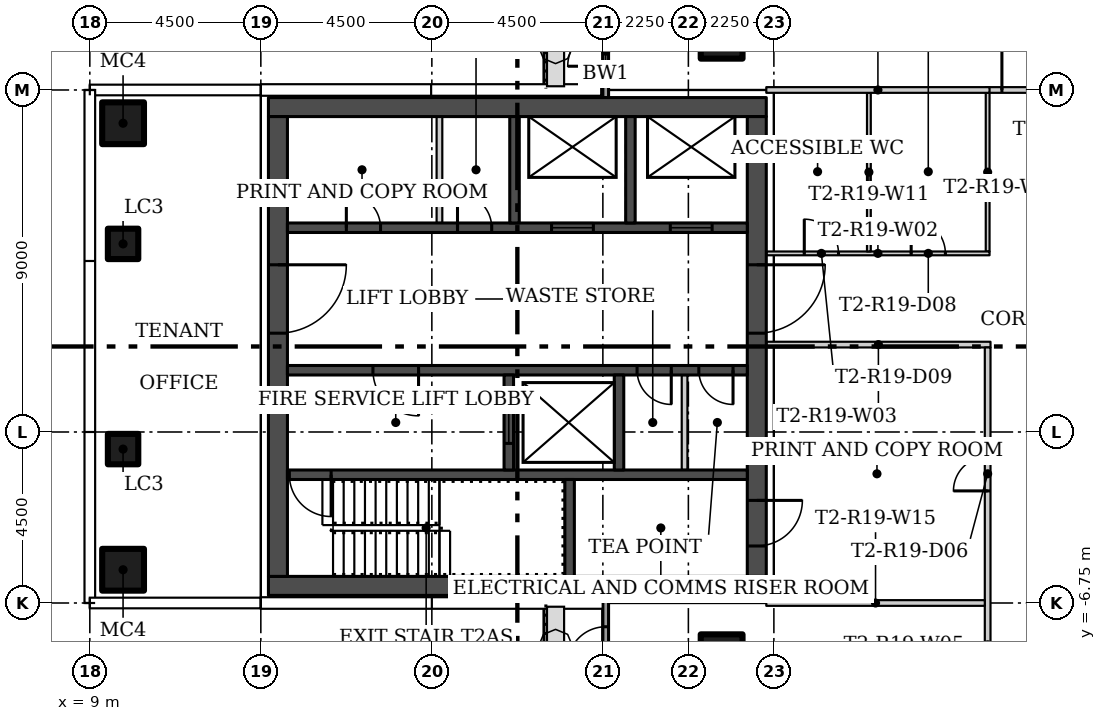
"""IFC4 building model, lengths in metres.
Left out: names, types, materials, properties, quantities, classifications, styles, units other than length and angle.
Written with IfcOpenShell. Run it as: python <this file> out.ifc"""

import sys

from ifc_helpers import new_model, si_unit, direction, frame, frame_2d, origin, origin_2d, place, context, subcontext, project, spatial, rectangle, hollow_rectangle, extrude, element, fill, save


model = new_model("IFC4")
c1 = context("Model", 3, precision=1e-05, world=origin(), true_north=direction((0.0, 1.0)))
c2 = subcontext(c1, "Body", "Model", "MODEL_VIEW")
j1 = project(units=[si_unit("LENGTHUNIT", "METRE"), si_unit("PLANEANGLEUNIT", "RADIAN")], contexts=[c1])
p1 = place(None, origin())
s1 = spatial("IfcSite", under=j1, at=p1, CompositionType="ELEMENT")
p2 = place(p1, origin())
s2 = spatial("IfcBuilding", under=s1, at=p2, CompositionType="ELEMENT")
p3 = place(p2, frame((0.0, 0.0, 174.0)))
s3 = spatial("IfcBuildingStorey", under=s2, at=p3, CompositionType="ELEMENT", Elevation=174.0)
for number, where in (
    (1, (25.625, 8.125, 0.0)),
    (2, (25.625, -8.125, 0.0)),
    (3, (9.875, -5.875, 0.0)),
    (4, (9.875, 5.875, 0.0)),
):
    element("IfcColumn", number, at=place(p3, frame(where)), inside=s3, PredefinedType="COLUMN", context=c2, shape_type="SweptSolid", body=[
        extrude(hollow_rectangle(XDim=1.1, YDim=1.1, WallThickness=0.04, at=origin_2d()), origin(), (0.0, 0.0, 1.0), 3.45),
    ])
for number, where in (
    (5, (9.875, -2.7, 0.0)),
    (6, (9.875, 2.7, 0.0)),
):
    element("IfcColumn", number, at=place(p3, frame(where)), inside=s3, PredefinedType="COLUMN", context=c2, shape_type="SweptSolid", body=[
        extrude(hollow_rectangle(XDim=0.8, YDim=0.8, WallThickness=0.03, at=origin_2d()), origin(), (0.0, 0.0, 1.0), 3.45),
    ])
p4 = place(p3, frame((32.625, 2.5, 0.0), z_axis=(0.0, 0.0, 1.0), x_axis=(0.0, 1.0, 0.0)))
e7 = element("IfcWall", 7, at=p4, inside=s3, PredefinedType="PARTITIONING", context=c2, shape_type="SweptSolid", body=[
    extrude(rectangle(XDim=4.175, YDim=0.1, at=frame_2d((2.087, 0.0))), origin(), (0.0, 0.0, 1.0), 3.45),
])
p5 = place(p3, frame((26.8, 2.45, 0.0)))
e8 = element("IfcWall", 8, at=p5, inside=s3, PredefinedType="PARTITIONING", context=c2, shape_type="SweptSolid", body=[
    extrude(rectangle(XDim=5.875, YDim=0.1, at=frame_2d((2.938, 0.0))), origin(), (0.0, 0.0, 1.0), 3.45),
])
p6 = place(p5, frame((3.812, 0.0, 0.0)))
e9 = element("IfcOpeningElement", 9, at=p6, cuts=e8, PredefinedType="OPENING", context=c2, shape_type="SweptSolid", body=[
    extrude(rectangle(XDim=0.9, YDim=2.1, at=frame_2d((0.45, 1.05))), frame((0.0, 0.06, 0.0), z_axis=(0.0, -1.0, 0.0), x_axis=(1.0, 0.0, 0.0)), (0.0, 0.0, 1.0), 0.12),
])
p7 = place(p5, frame((1.0, 0.0, 0.0)))
e10 = element("IfcOpeningElement", 10, at=p7, cuts=e8, PredefinedType="OPENING", context=c2, shape_type="SweptSolid", body=[
    extrude(rectangle(XDim=0.9, YDim=2.1, at=frame_2d((0.45, 1.05))), frame((0.0, 0.06, 0.0), z_axis=(0.0, -1.0, 0.0), x_axis=(1.0, 0.0, 0.0)), (0.0, 0.0, 1.0), 0.12),
])
p8 = place(p3, frame((32.7, 0.05, 0.0), z_axis=(0.0, 0.0, 1.0), x_axis=(-1.0, 0.0, 0.0)))
e11 = element("IfcWall", 11, at=p8, inside=s3, PredefinedType="PARTITIONING", context=c2, shape_type="SweptSolid", body=[
    extrude(rectangle(XDim=5.9, YDim=0.15, at=frame_2d((2.95, 0.0))), origin(), (0.0, 0.0, 1.0), 3.45),
])
p9 = place(p3, frame((32.625, -15.675, 0.0), z_axis=(0.0, 0.0, 1.0), x_axis=(0.0, 1.0, 0.0)))
e12 = element("IfcWall", 12, at=p9, inside=s3, PredefinedType="PARTITIONING", context=c2, shape_type="SweptSolid", body=[
    extrude(rectangle(XDim=15.65, YDim=0.15, at=frame_2d((7.825, 0.0))), origin(), (0.0, 0.0, 1.0), 3.45),
])
p10 = place(p9, frame((11.875, 0.0, 0.0)))
e13 = element("IfcOpeningElement", 13, at=p10, cuts=e12, PredefinedType="OPENING", context=c2, shape_type="SweptSolid", body=[
    extrude(rectangle(XDim=0.9, YDim=2.1, at=frame_2d((0.45, 1.05))), frame((0.0, 0.085, 0.0), z_axis=(0.0, -1.0, 0.0), x_axis=(1.0, 0.0, 0.0)), (0.0, 0.0, 1.0), 0.17),
])
p11 = place(p9, frame((3.925, 0.0, 0.0)))
e14 = element("IfcOpeningElement", 14, at=p11, cuts=e12, PredefinedType="OPENING", context=c2, shape_type="SweptSolid", body=[
    extrude(rectangle(XDim=1.0, YDim=2.4, at=frame_2d((0.5, 1.2))), frame((0.0, 0.085, 0.0), z_axis=(0.0, -1.0, 0.0), x_axis=(1.0, 0.0, 0.0)), (0.0, 0.0, 1.0), 0.17),
])
p12 = place(p3, frame((32.575, 6.75, 0.0)))
e15 = element("IfcWall", 15, at=p12, inside=s3, PredefinedType="PARTITIONING", context=c2, shape_type="SweptSolid", body=[
    extrude(rectangle(XDim=2.375, YDim=0.15, at=frame_2d((1.188, 0.0))), origin(), (0.0, 0.0, 1.0), 3.45),
])
p13 = place(p12, frame((0.425, 0.0, 0.0)))
e16 = element("IfcOpeningElement", 16, at=p13, cuts=e15, PredefinedType="OPENING", context=c2, shape_type="SweptSolid", body=[
    extrude(rectangle(XDim=1.5, YDim=2.1, at=frame_2d((0.75, 1.05))), frame((0.0, 0.085, 0.0), z_axis=(0.0, -1.0, 0.0), x_axis=(1.0, 0.0, 0.0)), (0.0, 0.0, 1.0), 0.17),
])
p14 = place(p3, frame((29.5, 6.675, 0.0), z_axis=(0.0, 0.0, 1.0), x_axis=(0.0, -1.0, 0.0)))
e17 = element("IfcWall", 17, at=p14, inside=s3, PredefinedType="PARTITIONING", context=c2, shape_type="SweptSolid", body=[
    extrude(rectangle(XDim=4.175, YDim=0.1, at=frame_2d((2.087, 0.0))), origin(), (0.0, 0.0, 1.0), 3.45),
])
p15 = place(p3, frame((32.675, 6.75, 0.0), z_axis=(0.0, 0.0, 1.0), x_axis=(-1.0, 0.0, 0.0)))
e18 = element("IfcWall", 18, at=p15, inside=s3, PredefinedType="PARTITIONING", context=c2, shape_type="SweptSolid", body=[
    extrude(rectangle(XDim=5.875, YDim=0.15, at=frame_2d((2.938, 0.0))), origin(), (0.0, 0.0, 1.0), 3.45),
])
p16 = place(p3, frame((26.8, -6.75, 0.0)))
e19 = element("IfcWall", 19, at=p16, inside=s3, PredefinedType="PARTITIONING", context=c2, shape_type="SweptSolid", body=[
    extrude(rectangle(XDim=5.75, YDim=0.15, at=frame_2d((2.875, 0.0))), origin(), (0.0, 0.0, 1.0), 3.45),
])
p17 = place(p3, frame((22.575, 6.543, 0.0), z_axis=(0.0, 0.0, 1.0), x_axis=(0.0, 1.0, 0.0)))
e20 = element("IfcWall", 20, at=p17, inside=s3, PredefinedType="SOLIDWALL", context=c2, shape_type="SweptSolid", body=[
    extrude(rectangle(XDim=2.457, YDim=0.15, at=frame_2d((1.229, 0.0))), origin(), (0.0, 0.0, 1.0), 3.45),
])
p18 = place(p17, frame((0.832, 0.0, 0.0)))
e21 = element("IfcOpeningElement", 21, at=p18, cuts=e20, PredefinedType="OPENING", context=c2, shape_type="SweptSolid", body=[
    extrude(rectangle(XDim=1.0, YDim=2.4, at=frame_2d((0.5, 1.2))), frame((0.0, 0.085, 0.0), z_axis=(0.0, -1.0, 0.0), x_axis=(1.0, 0.0, 0.0)), (0.0, 0.0, 1.0), 0.17),
])
p19 = place(p3, frame((22.575, -9.0, 0.0), z_axis=(0.0, 0.0, 1.0), x_axis=(0.0, 1.0, 0.0)))
e22 = element("IfcWall", 22, at=p19, inside=s3, PredefinedType="SOLIDWALL", context=c2, shape_type="SweptSolid", body=[
    extrude(rectangle(XDim=2.457, YDim=0.15, at=frame_2d((1.229, 0.0))), origin(), (0.0, 0.0, 1.0), 3.45),
])
p20 = place(p19, frame((0.625, 0.0, 0.0)))
e23 = element("IfcOpeningElement", 23, at=p20, cuts=e22, PredefinedType="OPENING", context=c2, shape_type="SweptSolid", body=[
    extrude(rectangle(XDim=1.0, YDim=2.4, at=frame_2d((0.5, 1.2))), frame((0.0, 0.085, 0.0), z_axis=(0.0, -1.0, 0.0), x_axis=(1.0, 0.0, 0.0)), (0.0, 0.0, 1.0), 0.17),
])
for number, where in (
    (24, (13.7, -6.3, 0.0)),
    (25, (13.7, 6.3, 0.0)),
):
    element("IfcWall", number, at=place(p3, frame(where)), inside=s3, PredefinedType="SHEAR", context=c2, shape_type="SweptSolid", body=[
        extrude(rectangle(XDim=13.1, YDim=0.5, at=frame_2d((6.55, 0.0))), origin(), (0.0, 0.0, 1.0), 3.45),
    ])
p21 = place(p3, frame((13.95, 6.05, 0.0), z_axis=(0.0, 0.0, 1.0), x_axis=(0.0, -1.0, 0.0)))
e26 = element("IfcWall", 26, at=p21, inside=s3, PredefinedType="SHEAR", context=c2, shape_type="SweptSolid", body=[
    extrude(rectangle(XDim=12.1, YDim=0.5, at=frame_2d((6.05, 0.0))), origin(), (0.0, 0.0, 1.0), 3.45),
])
p22 = place(p21, frame((3.9, 0.0, 0.0)))
e27 = element("IfcOpeningElement", 27, at=p22, cuts=e26, PredefinedType="OPENING", context=c2, shape_type="SweptSolid", body=[
    extrude(rectangle(XDim=1.8, YDim=2.4, at=frame_2d((0.9, 1.2))), frame((0.0, 0.26, 0.0), z_axis=(0.0, -1.0, 0.0), x_axis=(1.0, 0.0, 0.0)), (0.0, 0.0, 1.0), 0.52),
])
p23 = place(p3, frame((26.55, 6.05, 0.0), z_axis=(0.0, 0.0, 1.0), x_axis=(0.0, -1.0, 0.0)))
e28 = element("IfcWall", 28, at=p23, inside=s3, PredefinedType="SHEAR", context=c2, shape_type="SweptSolid", body=[
    extrude(rectangle(XDim=12.1, YDim=0.5, at=frame_2d((6.05, 0.0))), origin(), (0.0, 0.0, 1.0), 3.45),
])
p24 = place(p23, frame((10.1, 0.0, 0.0)))
e29 = element("IfcOpeningElement", 29, at=p24, cuts=e28, PredefinedType="OPENING", context=c2, shape_type="SweptSolid", body=[
    extrude(rectangle(XDim=1.2, YDim=2.1, at=frame_2d((0.6, 1.05))), frame((0.0, 0.26, 0.0), z_axis=(0.0, -1.0, 0.0), x_axis=(1.0, 0.0, 0.0)), (0.0, 0.0, 1.0), 0.52),
])
p25 = place(p23, frame((3.9, 0.0, 0.0)))
e30 = element("IfcOpeningElement", 30, at=p25, cuts=e28, PredefinedType="OPENING", context=c2, shape_type="SweptSolid", body=[
    extrude(rectangle(XDim=1.8, YDim=2.4, at=frame_2d((0.9, 1.2))), frame((0.0, 0.26, 0.0), z_axis=(0.0, -1.0, 0.0), x_axis=(1.0, 0.0, 0.0)), (0.0, 0.0, 1.0), 0.52),
])
p26 = place(p3, frame((26.3, -3.375, 0.0), z_axis=(0.0, 0.0, 1.0), x_axis=(-1.0, 0.0, 0.0)))
e31 = element("IfcWall", 31, at=p26, inside=s3, PredefinedType="SHEAR", context=c2, shape_type="SweptSolid", body=[
    extrude(rectangle(XDim=12.1, YDim=0.25, at=frame_2d((6.05, 0.0))), origin(), (0.0, 0.0, 1.0), 3.45),
])
p27 = place(p26, frame((10.95, 0.0, 0.0)))
e32 = element("IfcOpeningElement", 32, at=p27, cuts=e31, PredefinedType="OPENING", context=c2, shape_type="SweptSolid", body=[
    extrude(rectangle(XDim=1.1, YDim=2.1, at=frame_2d((0.55, 1.05))), frame((0.0, 0.135, 0.0), z_axis=(0.0, -1.0, 0.0), x_axis=(1.0, 0.0, 0.0)), (0.0, 0.0, 1.0), 0.27),
])
p28 = place(p3, frame((21.625, -6.05, 0.0), z_axis=(0.0, 0.0, 1.0), x_axis=(0.0, 1.0, 0.0)))
e33 = element("IfcWall", 33, at=p28, inside=s3, PredefinedType="SHEAR", context=c2, shape_type="SweptSolid", body=[
    extrude(rectangle(XDim=2.55, YDim=0.25, at=frame_2d((1.275, 0.0))), origin(), (0.0, 0.0, 1.0), 3.45),
])
p29 = place(p3, frame((26.3, -0.625, 0.0), z_axis=(0.0, 0.0, 1.0), x_axis=(-1.0, 0.0, 0.0)))
e34 = element("IfcWall", 34, at=p29, inside=s3, PredefinedType="SHEAR", context=c2, shape_type="SweptSolid", body=[
    extrude(rectangle(XDim=12.1, YDim=0.25, at=frame_2d((6.05, 0.0))), origin(), (0.0, 0.0, 1.0), 3.45),
])
p30 = place(p29, frame((8.65, 0.0, 0.0)))
e35 = element("IfcOpeningElement", 35, at=p30, cuts=e34, PredefinedType="OPENING", context=c2, shape_type="SweptSolid", body=[
    extrude(rectangle(XDim=1.2, YDim=2.1, at=frame_2d((0.6, 1.05))), frame((0.0, 0.135, 0.0), z_axis=(0.0, -1.0, 0.0), x_axis=(1.0, 0.0, 0.0)), (0.0, 0.0, 1.0), 0.27),
])
p31 = place(p29, frame((2.0, 0.0, 0.0)))
e36 = element("IfcOpeningElement", 36, at=p31, cuts=e34, PredefinedType="OPENING", context=c2, shape_type="SweptSolid", body=[
    extrude(rectangle(XDim=0.9, YDim=2.1, at=frame_2d((0.45, 1.05))), frame((0.0, 0.135, 0.0), z_axis=(0.0, -1.0, 0.0), x_axis=(1.0, 0.0, 0.0)), (0.0, 0.0, 1.0), 0.27),
])
p32 = place(p29, frame((0.375, 0.0, 0.0)))
e37 = element("IfcOpeningElement", 37, at=p32, cuts=e34, PredefinedType="OPENING", context=c2, shape_type="SweptSolid", body=[
    extrude(rectangle(XDim=0.9, YDim=2.1, at=frame_2d((0.45, 1.05))), frame((0.0, 0.135, 0.0), z_axis=(0.0, -1.0, 0.0), x_axis=(1.0, 0.0, 0.0)), (0.0, 0.0, 1.0), 0.27),
])
p33 = place(p3, frame((20.025, -3.25, 0.0), z_axis=(0.0, 0.0, 1.0), x_axis=(0.0, 1.0, 0.0)))
e38 = element("IfcWall", 38, at=p33, inside=s3, PredefinedType="SHEAR", context=c2, shape_type="SweptSolid", body=[
    extrude(rectangle(XDim=2.5, YDim=0.25, at=frame_2d((1.25, 0.0))), origin(), (0.0, 0.0, 1.0), 3.45),
])
p34 = place(p33, frame((0.7, 0.0, 0.0)))
e39 = element("IfcOpeningElement", 39, at=p34, cuts=e38, PredefinedType="OPENING", context=c2, shape_type="SweptSolid", body=[
    extrude(rectangle(XDim=1.1, YDim=2.1, at=frame_2d((0.55, 1.05))), frame((0.0, 0.135, 0.0), z_axis=(0.0, -1.0, 0.0), x_axis=(1.0, 0.0, 0.0)), (0.0, 0.0, 1.0), 0.27),
])
p35 = place(p3, frame((22.925, -3.25, 0.0), z_axis=(0.0, 0.0, 1.0), x_axis=(0.0, 1.0, 0.0)))
e40 = element("IfcWall", 40, at=p35, inside=s3, PredefinedType="SHEAR", context=c2, shape_type="SweptSolid", body=[
    extrude(rectangle(XDim=2.5, YDim=0.25, at=frame_2d((1.25, 0.0))), origin(), (0.0, 0.0, 1.0), 3.45),
])
p36 = place(p3, frame((24.65, -3.25, 0.0), z_axis=(0.0, 0.0, 1.0), x_axis=(0.0, 1.0, 0.0)))
e41 = element("IfcWall", 41, at=p36, inside=s3, PredefinedType="PARTITIONING", context=c2, shape_type="SweptSolid", body=[
    extrude(rectangle(XDim=2.5, YDim=0.15, at=frame_2d((1.25, 0.0))), origin(), (0.0, 0.0, 1.0), 3.45),
])
p37 = place(p3, frame((14.2, 3.125, 0.0)))
e42 = element("IfcWall", 42, at=p37, inside=s3, PredefinedType="SHEAR", context=c2, shape_type="SweptSolid", body=[
    extrude(rectangle(XDim=12.1, YDim=0.25, at=frame_2d((6.05, 0.0))), origin(), (0.0, 0.0, 1.0), 3.45),
])
p38 = place(p37, frame((6.95, 0.0, 0.0)))
e43 = element("IfcOpeningElement", 43, at=p38, cuts=e42, PredefinedType="OPENING", context=c2, shape_type="SweptSolid", body=[
    extrude(rectangle(XDim=1.1, YDim=2.1, at=frame_2d((0.55, 1.05))), frame((0.0, 0.135, 0.0), z_axis=(0.0, -1.0, 0.0), x_axis=(1.0, 0.0, 0.0)), (0.0, 0.0, 1.0), 0.27),
])
p39 = place(p37, frame((10.075, 0.0, 0.0)))
e44 = element("IfcOpeningElement", 44, at=p39, cuts=e42, PredefinedType="OPENING", context=c2, shape_type="SweptSolid", body=[
    extrude(rectangle(XDim=1.1, YDim=2.1, at=frame_2d((0.55, 1.05))), frame((0.0, 0.135, 0.0), z_axis=(0.0, -1.0, 0.0), x_axis=(1.0, 0.0, 0.0)), (0.0, 0.0, 1.0), 0.27),
])
p40 = place(p37, frame((1.55, 0.0, 0.0)))
e45 = element("IfcOpeningElement", 45, at=p40, cuts=e42, PredefinedType="OPENING", context=c2, shape_type="SweptSolid", body=[
    extrude(rectangle(XDim=0.9, YDim=2.1, at=frame_2d((0.45, 1.05))), frame((0.0, 0.135, 0.0), z_axis=(0.0, -1.0, 0.0), x_axis=(1.0, 0.0, 0.0)), (0.0, 0.0, 1.0), 0.27),
])
p41 = place(p37, frame((4.475, 0.0, 0.0)))
e46 = element("IfcOpeningElement", 46, at=p41, cuts=e42, PredefinedType="OPENING", context=c2, shape_type="SweptSolid", body=[
    extrude(rectangle(XDim=0.9, YDim=2.1, at=frame_2d((0.45, 1.05))), frame((0.0, 0.135, 0.0), z_axis=(0.0, -1.0, 0.0), x_axis=(1.0, 0.0, 0.0)), (0.0, 0.0, 1.0), 0.27),
])
for number, where, z_axis, x_axis in (
    (47, (20.175, 3.25, 0.0), (0.0, 0.0, 1.0), (0.0, 1.0, 0.0)),
    (48, (23.225, 3.25, 0.0), (0.0, 0.0, 1.0), (0.0, 1.0, 0.0)),
):
    element("IfcWall", number, at=place(p3, frame(where, z_axis=z_axis, x_axis=x_axis)), inside=s3, PredefinedType="SHEAR", context=c2, shape_type="SweptSolid", body=[
        extrude(rectangle(XDim=2.8, YDim=0.25, at=frame_2d((1.4, 0.0))), origin(), (0.0, 0.0, 1.0), 3.45),
    ])
p42 = place(p3, frame((18.2, 3.25, 0.0), z_axis=(0.0, 0.0, 1.0), x_axis=(0.0, 1.0, 0.0)))
e49 = element("IfcWall", 49, at=p42, inside=s3, PredefinedType="PARTITIONING", context=c2, shape_type="SweptSolid", body=[
    extrude(rectangle(XDim=2.8, YDim=0.15, at=frame_2d((1.4, 0.0))), origin(), (0.0, 0.0, 1.0), 3.45),
])
p43 = place(p13, origin())
e50 = element("IfcDoor", 50, at=p43, inside=s3, OperationType="DOUBLE_DOOR_SINGLE_SWING", PredefinedType="DOOR", context=c2, shape_type="SweptSolid", body=[
    extrude(rectangle(XDim=1.5, YDim=2.1, at=frame_2d((0.75, 1.05))), frame((0.0, 0.025, 0.0), z_axis=(0.0, -1.0, 0.0), x_axis=(1.0, 0.0, 0.0)), (0.0, 0.0, 1.0), 0.05),
])
fill(e16, e50)
p44 = place(p10, origin())
e51 = element("IfcDoor", 51, at=p44, inside=s3, OperationType="SINGLE_SWING_RIGHT", PredefinedType="DOOR", context=c2, shape_type="SweptSolid", body=[
    extrude(rectangle(XDim=0.9, YDim=2.1, at=frame_2d((0.45, 1.05))), frame((0.0, 0.025, 0.0), z_axis=(0.0, -1.0, 0.0), x_axis=(1.0, 0.0, 0.0)), (0.0, 0.0, 1.0), 0.05),
])
fill(e13, e51)
p45 = place(p6, origin())
e52 = element("IfcDoor", 52, at=p45, inside=s3, OperationType="SINGLE_SWING_LEFT", PredefinedType="DOOR", context=c2, shape_type="SweptSolid", body=[
    extrude(rectangle(XDim=0.9, YDim=2.1, at=frame_2d((0.45, 1.05))), frame((0.0, 0.025, 0.0), z_axis=(0.0, -1.0, 0.0), x_axis=(1.0, 0.0, 0.0)), (0.0, 0.0, 1.0), 0.05),
])
fill(e9, e52)
p46 = place(p7, origin())
e53 = element("IfcDoor", 53, at=p46, inside=s3, OperationType="SINGLE_SWING_RIGHT", PredefinedType="DOOR", context=c2, shape_type="SweptSolid", body=[
    extrude(rectangle(XDim=0.9, YDim=2.1, at=frame_2d((0.45, 1.05))), frame((0.0, 0.025, 0.0), z_axis=(0.0, -1.0, 0.0), x_axis=(1.0, 0.0, 0.0)), (0.0, 0.0, 1.0), 0.05),
])
fill(e10, e53)
p47 = place(p18, origin())
e54 = element("IfcDoor", 54, at=p47, inside=s3, OperationType="SINGLE_SWING_LEFT", PredefinedType="DOOR", context=c2, shape_type="SweptSolid", body=[
    extrude(rectangle(XDim=1.0, YDim=2.4, at=frame_2d((0.5, 1.2))), frame((0.0, 0.025, 0.0), z_axis=(0.0, -1.0, 0.0), x_axis=(1.0, 0.0, 0.0)), (0.0, 0.0, 1.0), 0.05),
])
fill(e21, e54)
p48 = place(p20, origin())
e55 = element("IfcDoor", 55, at=p48, inside=s3, OperationType="SINGLE_SWING_LEFT", PredefinedType="DOOR", context=c2, shape_type="SweptSolid", body=[
    extrude(rectangle(XDim=1.0, YDim=2.4, at=frame_2d((0.5, 1.2))), frame((0.0, 0.025, 0.0), z_axis=(0.0, -1.0, 0.0), x_axis=(1.0, 0.0, 0.0)), (0.0, 0.0, 1.0), 0.05),
])
fill(e23, e55)
p49 = place(p22, origin())
e56 = element("IfcDoor", 56, at=p49, inside=s3, OperationType="DOUBLE_DOOR_SINGLE_SWING", PredefinedType="DOOR", context=c2, shape_type="SweptSolid", body=[
    extrude(rectangle(XDim=1.8, YDim=2.4, at=frame_2d((0.9, 1.2))), frame((0.0, 0.025, 0.0), z_axis=(0.0, -1.0, 0.0), x_axis=(1.0, 0.0, 0.0)), (0.0, 0.0, 1.0), 0.05),
])
fill(e27, e56)
p50 = place(p24, origin())
e57 = element("IfcDoor", 57, at=p50, inside=s3, OperationType="SINGLE_SWING_RIGHT", PredefinedType="DOOR", context=c2, shape_type="SweptSolid", body=[
    extrude(rectangle(XDim=1.2, YDim=2.1, at=frame_2d((0.6, 1.05))), frame((0.0, 0.025, 0.0), z_axis=(0.0, -1.0, 0.0), x_axis=(1.0, 0.0, 0.0)), (0.0, 0.0, 1.0), 0.05),
])
fill(e29, e57)
p51 = place(p25, origin())
e58 = element("IfcDoor", 58, at=p51, inside=s3, OperationType="DOUBLE_DOOR_SINGLE_SWING", PredefinedType="DOOR", context=c2, shape_type="SweptSolid", body=[
    extrude(rectangle(XDim=1.8, YDim=2.4, at=frame_2d((0.9, 1.2))), frame((0.0, 0.025, 0.0), z_axis=(0.0, -1.0, 0.0), x_axis=(1.0, 0.0, 0.0)), (0.0, 0.0, 1.0), 0.05),
])
fill(e30, e58)
p52 = place(p27, origin())
e59 = element("IfcDoor", 59, at=p52, inside=s3, OperationType="SINGLE_SWING_RIGHT", PredefinedType="DOOR", context=c2, shape_type="SweptSolid", body=[
    extrude(rectangle(XDim=1.1, YDim=2.1, at=frame_2d((0.55, 1.05))), frame((0.0, 0.025, 0.0), z_axis=(0.0, -1.0, 0.0), x_axis=(1.0, 0.0, 0.0)), (0.0, 0.0, 1.0), 0.05),
])
fill(e32, e59)
p53 = place(p30, origin())
e60 = element("IfcDoor", 60, at=p53, inside=s3, OperationType="SINGLE_SWING_RIGHT", PredefinedType="DOOR", context=c2, shape_type="SweptSolid", body=[
    extrude(rectangle(XDim=1.2, YDim=2.1, at=frame_2d((0.6, 1.05))), frame((0.0, 0.025, 0.0), z_axis=(0.0, -1.0, 0.0), x_axis=(1.0, 0.0, 0.0)), (0.0, 0.0, 1.0), 0.05),
])
fill(e35, e60)
p54 = place(p31, origin())
e61 = element("IfcDoor", 61, at=p54, inside=s3, OperationType="SINGLE_SWING_LEFT", PredefinedType="DOOR", context=c2, shape_type="SweptSolid", body=[
    extrude(rectangle(XDim=0.9, YDim=2.1, at=frame_2d((0.45, 1.05))), frame((0.0, 0.025, 0.0), z_axis=(0.0, -1.0, 0.0), x_axis=(1.0, 0.0, 0.0)), (0.0, 0.0, 1.0), 0.05),
])
fill(e36, e61)
p55 = place(p32, origin())
e62 = element("IfcDoor", 62, at=p55, inside=s3, OperationType="SINGLE_SWING_LEFT", PredefinedType="DOOR", context=c2, shape_type="SweptSolid", body=[
    extrude(rectangle(XDim=0.9, YDim=2.1, at=frame_2d((0.45, 1.05))), frame((0.0, 0.025, 0.0), z_axis=(0.0, -1.0, 0.0), x_axis=(1.0, 0.0, 0.0)), (0.0, 0.0, 1.0), 0.05),
])
fill(e37, e62)
p56 = place(p34, origin())
e63 = element("IfcDoor", 63, at=p56, inside=s3, OperationType="SLIDING_TO_LEFT", PredefinedType="DOOR", context=c2, shape_type="SweptSolid", body=[
    extrude(rectangle(XDim=1.1, YDim=2.1, at=frame_2d((0.55, 1.05))), frame((0.0, 0.025, 0.0), z_axis=(0.0, -1.0, 0.0), x_axis=(1.0, 0.0, 0.0)), (0.0, 0.0, 1.0), 0.05),
])
fill(e39, e63)
p57 = place(p38, origin())
e64 = element("IfcDoor", 64, at=p57, inside=s3, OperationType="SLIDING_TO_LEFT", PredefinedType="DOOR", context=c2, shape_type="SweptSolid", body=[
    extrude(rectangle(XDim=1.1, YDim=2.1, at=frame_2d((0.55, 1.05))), frame((0.0, 0.025, 0.0), z_axis=(0.0, -1.0, 0.0), x_axis=(1.0, 0.0, 0.0)), (0.0, 0.0, 1.0), 0.05),
])
fill(e43, e64)
p58 = place(p39, origin())
e65 = element("IfcDoor", 65, at=p58, inside=s3, OperationType="SLIDING_TO_LEFT", PredefinedType="DOOR", context=c2, shape_type="SweptSolid", body=[
    extrude(rectangle(XDim=1.1, YDim=2.1, at=frame_2d((0.55, 1.05))), frame((0.0, 0.025, 0.0), z_axis=(0.0, -1.0, 0.0), x_axis=(1.0, 0.0, 0.0)), (0.0, 0.0, 1.0), 0.05),
])
fill(e44, e65)
p59 = place(p40, origin())
e66 = element("IfcDoor", 66, at=p59, inside=s3, OperationType="SINGLE_SWING_LEFT", PredefinedType="DOOR", context=c2, shape_type="SweptSolid", body=[
    extrude(rectangle(XDim=0.9, YDim=2.1, at=frame_2d((0.45, 1.05))), frame((0.0, 0.025, 0.0), z_axis=(0.0, -1.0, 0.0), x_axis=(1.0, 0.0, 0.0)), (0.0, 0.0, 1.0), 0.05),
])
fill(e45, e66)
p60 = place(p41, origin())
e67 = element("IfcDoor", 67, at=p60, inside=s3, OperationType="SINGLE_SWING_LEFT", PredefinedType="DOOR", context=c2, shape_type="SweptSolid", body=[
    extrude(rectangle(XDim=0.9, YDim=2.1, at=frame_2d((0.45, 1.05))), frame((0.0, 0.025, 0.0), z_axis=(0.0, -1.0, 0.0), x_axis=(1.0, 0.0, 0.0)), (0.0, 0.0, 1.0), 0.05),
])
fill(e46, e67)
save(model, sys.argv[1])
